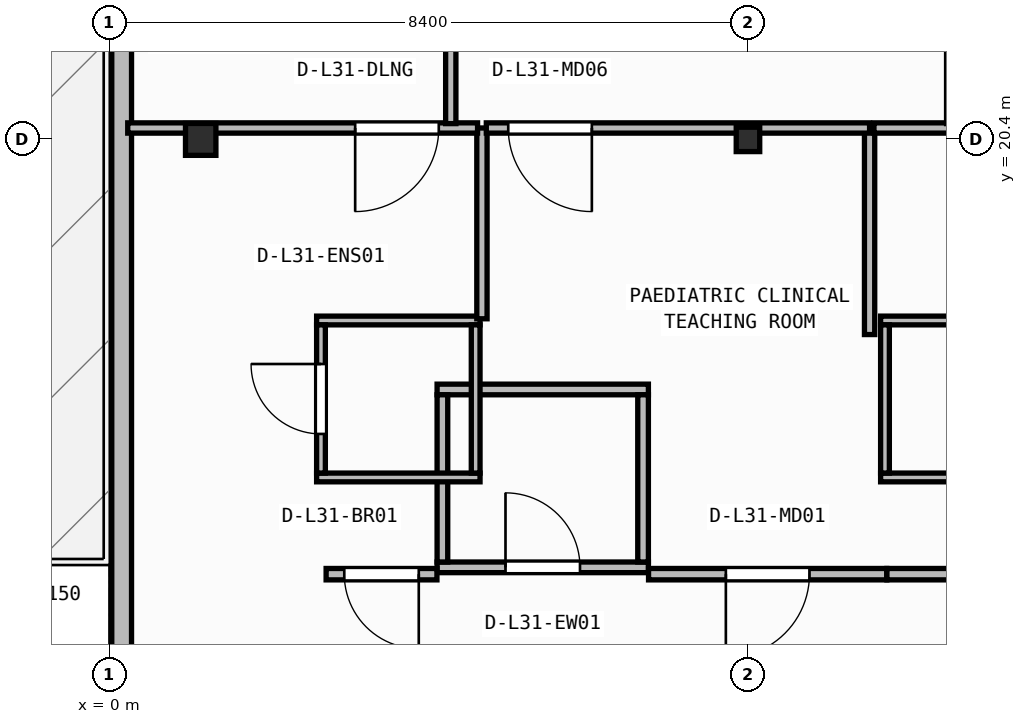
"""IFC4 building model, lengths in metres.
Left out: names, types, materials, properties, quantities, classifications, styles, units other than length and angle.
Written with IfcOpenShell. Run it as: python <this file> out.ifc"""

import sys

from ifc_helpers import new_model, si_unit, direction, frame, frame_2d, origin, origin_2d, place, context, subcontext, project, spatial, rectangle, i_section, extrude, element, fill, save


model = new_model("IFC4")
c1 = context("Model", 3, precision=1e-05, world=origin(), true_north=direction((0.0, 1.0)))
c2 = subcontext(c1, "Body", "Model", "MODEL_VIEW")
j1 = project(units=[si_unit("LENGTHUNIT", "METRE"), si_unit("PLANEANGLEUNIT", "RADIAN")], contexts=[c1])
p1 = place(None, origin())
s1 = spatial("IfcSite", under=j1, at=p1, CompositionType="ELEMENT")
p2 = place(p1, origin())
s2 = spatial("IfcBuilding", under=s1, at=p2, CompositionType="ELEMENT")
p3 = place(p2, frame((0.0, 0.0, 127.05)))
s3 = spatial("IfcBuildingStorey", under=s2, at=p3, CompositionType="ELEMENT", Elevation=127.05)
p4 = place(p3, frame((1.2, 20.4, 0.0), z_axis=(0.0, 0.0, 1.0), x_axis=(1.0, 0.0, 0.0)))
e1 = element("IfcColumn", 1, at=p4, inside=s3, PredefinedType="COLUMN", context=c2, shape_type="SweptSolid", body=[
    extrude(i_section(OverallWidth=0.4, OverallDepth=0.42, WebThickness=0.025, FlangeThickness=0.04, at=origin_2d()), origin(), (0.0, 0.0, 1.0), 3.95),
])
p5 = place(p3, frame((8.4, 20.4, 0.0), z_axis=(0.0, 0.0, 1.0), x_axis=(1.0, 0.0, 0.0)))
e2 = element("IfcColumn", 2, at=p5, inside=s3, PredefinedType="COLUMN", context=c2, shape_type="SweptSolid", body=[
    extrude(i_section(OverallWidth=0.309, OverallDepth=0.321, WebThickness=0.014, FlangeThickness=0.022, FilletRadius=0.017, at=origin_2d()), origin(), (0.0, 0.0, 1.0), 3.95),
])
p6 = place(p3, frame((0.16, 40.64, 0.0), z_axis=(0.0, 0.0, 1.0), x_axis=(0.0, -1.0, 0.0)))
e3 = element("IfcWall", 3, at=p6, inside=s3, PredefinedType="STANDARD", context=c2, shape_type="SweptSolid", body=[
    extrude(rectangle(XDim=37.88, YDim=0.26, at=frame_2d((18.94, 0.0))), origin(), (0.0, 0.0, 1.0), 3.71),
])
p7 = place(p6, frame((14.081, 0.0, 0.0)))
e4 = element("IfcOpeningElement", 4, at=p7, cuts=e3, PredefinedType="OPENING", context=c2, shape_type="SweptSolid", body=[
    extrude(rectangle(XDim=1.3, YDim=2.15, at=frame_2d((0.65, 1.075))), frame((0.0, 0.14, 0.0), z_axis=(0.0, -1.0, 0.0), x_axis=(1.0, 0.0, 0.0)), (0.0, 0.0, 1.0), 0.28),
])
p8 = place(p3, frame((4.31, 14.77, 0.0), z_axis=(0.0, 0.0, 1.0), x_axis=(1.0, 0.0, 0.0)))
e5 = element("IfcWall", 5, at=p8, inside=s3, PredefinedType="PARTITIONING", context=c2, shape_type="SweptSolid", body=[
    extrude(rectangle(XDim=2.78, YDim=0.14, at=frame_2d((1.39, 0.0))), origin(), (0.0, 0.0, 1.0), 3.71),
])
p9 = place(p8, frame((0.9, 0.0, 0.0)))
e6 = element("IfcOpeningElement", 6, at=p9, cuts=e5, PredefinedType="OPENING", context=c2, shape_type="SweptSolid", body=[
    extrude(rectangle(XDim=0.98, YDim=2.1, at=frame_2d((0.49, 1.05))), frame((0.0, 0.08, 0.0), z_axis=(0.0, -1.0, 0.0), x_axis=(1.0, 0.0, 0.0)), (0.0, 0.0, 1.0), 0.16),
])
p10 = place(p3, frame((4.31, 17.11, 0.0), z_axis=(0.0, 0.0, 1.0), x_axis=(1.0, 0.0, 0.0)))
e7 = element("IfcWall", 7, at=p10, inside=s3, PredefinedType="PARTITIONING", context=c2, shape_type="SweptSolid", body=[
    extrude(rectangle(XDim=2.78, YDim=0.14, at=frame_2d((1.39, 0.0))), origin(), (0.0, 0.0, 1.0), 3.71),
])
for number, where, z_axis, x_axis in (
    (8, (4.38, 14.84, 0.0), (0.0, 0.0, 1.0), (0.0, 1.0, 0.0)),
    (9, (7.02, 14.84, 0.0), (0.0, 0.0, 1.0), (0.0, 1.0, 0.0)),
):
    element("IfcWall", number, at=place(p3, frame(where, z_axis=z_axis, x_axis=x_axis)), inside=s3, PredefinedType="PARTITIONING", context=c2, shape_type="SweptSolid", body=[
        extrude(rectangle(XDim=2.2, YDim=0.14, at=frame_2d((1.1, 0.0))), origin(), (0.0, 0.0, 1.0), 3.71),
    ])
for number, where, z_axis, x_axis in (
    (10, (2.725, 15.952, 0.0), (0.0, 0.0, 1.0), (1.0, 0.0, 0.0)),
    (11, (2.725, 18.018, 0.0), (0.0, 0.0, 1.0), (1.0, 0.0, 0.0)),
):
    element("IfcWall", number, at=place(p3, frame(where, z_axis=z_axis, x_axis=x_axis)), inside=s3, PredefinedType="PARTITIONING", context=c2, shape_type="SweptSolid", body=[
        extrude(rectangle(XDim=2.15, YDim=0.115, at=frame_2d((1.075, 0.0))), origin(), (0.0, 0.0, 1.0), 3.71),
    ])
p11 = place(p3, frame((2.782, 16.01, 0.0), z_axis=(0.0, 0.0, 1.0), x_axis=(0.0, 1.0, 0.0)))
e12 = element("IfcWall", 12, at=p11, inside=s3, PredefinedType="PARTITIONING", context=c2, shape_type="SweptSolid", body=[
    extrude(rectangle(XDim=1.95, YDim=0.115, at=frame_2d((0.975, 0.0))), origin(), (0.0, 0.0, 1.0), 3.71),
])
p12 = place(p11, frame((0.515, 0.0, 0.0)))
e13 = element("IfcOpeningElement", 13, at=p12, cuts=e12, PredefinedType="OPENING", context=c2, shape_type="SweptSolid", body=[
    extrude(rectangle(XDim=0.92, YDim=2.1, at=frame_2d((0.46, 1.05))), frame((0.0, 0.067, 0.0), z_axis=(0.0, -1.0, 0.0), x_axis=(1.0, 0.0, 0.0)), (0.0, 0.0, 1.0), 0.135),
])
p13 = place(p3, frame((4.817, 16.01, 0.0), z_axis=(0.0, 0.0, 1.0), x_axis=(0.0, 1.0, 0.0)))
e14 = element("IfcWall", 14, at=p13, inside=s3, PredefinedType="PARTITIONING", context=c2, shape_type="SweptSolid", body=[
    extrude(rectangle(XDim=1.95, YDim=0.115, at=frame_2d((0.975, 0.0))), origin(), (0.0, 0.0, 1.0), 3.71),
])
for number, where, z_axis, x_axis in (
    (15, (10.145, 15.952, 0.0), (0.0, 0.0, 1.0), (1.0, 0.0, 0.0)),
    (16, (10.145, 18.018, 0.0), (0.0, 0.0, 1.0), (1.0, 0.0, 0.0)),
):
    element("IfcWall", number, at=place(p3, frame(where, z_axis=z_axis, x_axis=x_axis)), inside=s3, PredefinedType="PARTITIONING", context=c2, shape_type="SweptSolid", body=[
        extrude(rectangle(XDim=2.15, YDim=0.115, at=frame_2d((1.075, 0.0))), origin(), (0.0, 0.0, 1.0), 3.71),
    ])
p14 = place(p3, frame((10.202, 16.01, 0.0), z_axis=(0.0, 0.0, 1.0), x_axis=(0.0, 1.0, 0.0)))
e17 = element("IfcWall", 17, at=p14, inside=s3, PredefinedType="PARTITIONING", context=c2, shape_type="SweptSolid", body=[
    extrude(rectangle(XDim=1.95, YDim=0.115, at=frame_2d((0.975, 0.0))), origin(), (0.0, 0.0, 1.0), 3.71),
])
p15 = place(p3, frame((4.308, 14.68, 0.0), z_axis=(0.0, 0.0, 1.0), x_axis=(-1.0, 0.0, 0.0)))
e18 = element("IfcWall", 18, at=p15, inside=s3, PredefinedType="PARTITIONING", context=c2, shape_type="SweptSolid", body=[
    extrude(rectangle(XDim=1.458, YDim=0.15, at=frame_2d((0.729, 0.0))), origin(), (0.0, 0.0, 1.0), 3.71),
])
p16 = place(p15, frame((0.239, 0.0, 0.0)))
e19 = element("IfcOpeningElement", 19, at=p16, cuts=e18, PredefinedType="OPENING", context=c2, shape_type="SweptSolid", body=[
    extrude(rectangle(XDim=0.98, YDim=2.1, at=frame_2d((0.49, 1.05))), frame((0.0, 0.085, 0.0), z_axis=(0.0, -1.0, 0.0), x_axis=(1.0, 0.0, 0.0)), (0.0, 0.0, 1.0), 0.17),
])
p17 = place(p3, frame((10.226, 14.68, 0.0), z_axis=(0.0, 0.0, 1.0), x_axis=(-1.0, 0.0, 0.0)))
e20 = element("IfcWall", 20, at=p17, inside=s3, PredefinedType="PARTITIONING", context=c2, shape_type="SweptSolid", body=[
    extrude(rectangle(XDim=3.134, YDim=0.15, at=frame_2d((1.567, 0.0))), origin(), (0.0, 0.0, 1.0), 3.71),
])
p18 = place(p17, frame((1.017, 0.0, 0.0)))
e21 = element("IfcOpeningElement", 21, at=p18, cuts=e20, PredefinedType="OPENING", context=c2, shape_type="SweptSolid", body=[
    extrude(rectangle(XDim=1.1, YDim=2.1, at=frame_2d((0.55, 1.05))), frame((0.0, 0.085, 0.0), z_axis=(0.0, -1.0, 0.0), x_axis=(1.0, 0.0, 0.0)), (0.0, 0.0, 1.0), 0.17),
])
p19 = place(p3, frame((14.566, 14.68, 0.0), z_axis=(0.0, 0.0, 1.0), x_axis=(-1.0, 0.0, 0.0)))
e22 = element("IfcWall", 22, at=p19, inside=s3, PredefinedType="PARTITIONING", context=c2, shape_type="SweptSolid", body=[
    extrude(rectangle(XDim=4.338, YDim=0.15, at=frame_2d((2.169, 0.0))), origin(), (0.0, 0.0, 1.0), 3.71),
])
p20 = place(p19, frame((1.619, 0.0, 0.0)))
e23 = element("IfcOpeningElement", 23, at=p20, cuts=e22, PredefinedType="OPENING", context=c2, shape_type="SweptSolid", body=[
    extrude(rectangle(XDim=1.1, YDim=2.1, at=frame_2d((0.55, 1.05))), frame((0.0, 0.085, 0.0), z_axis=(0.0, -1.0, 0.0), x_axis=(1.0, 0.0, 0.0)), (0.0, 0.0, 1.0), 0.17),
])
p21 = place(p3, frame((4.9, 18.04, 0.0), z_axis=(0.0, 0.0, 1.0), x_axis=(0.0, 1.0, 0.0)))
e24 = element("IfcWall", 24, at=p21, inside=s3, PredefinedType="PARTITIONING", context=c2, shape_type="SweptSolid", body=[
    extrude(rectangle(XDim=2.51, YDim=0.135, at=frame_2d((1.255, 0.0))), origin(), (0.0, 0.0, 1.0), 3.71),
])
p22 = place(p3, frame((4.843, 20.55, 0.0), z_axis=(0.0, 0.0, 1.0), x_axis=(-1.0, 0.0, 0.0)))
e25 = element("IfcWall", 25, at=p22, inside=s3, PredefinedType="PARTITIONING", context=c2, shape_type="SweptSolid", body=[
    extrude(rectangle(XDim=4.603, YDim=0.135, at=frame_2d((2.301, 0.0))), origin(), (0.0, 0.0, 1.0), 3.083),
])
p23 = place(p22, frame((0.51, 0.0, 0.0)))
e26 = element("IfcOpeningElement", 26, at=p23, cuts=e25, PredefinedType="OPENING", context=c2, shape_type="SweptSolid", body=[
    extrude(rectangle(XDim=1.1, YDim=2.1, at=frame_2d((0.55, 1.05))), frame((0.0, 0.077, 0.0), z_axis=(0.0, -1.0, 0.0), x_axis=(1.0, 0.0, 0.0)), (0.0, 0.0, 1.0), 0.155),
])
p24 = place(p3, frame((10.0, 17.833, 0.0), z_axis=(0.0, 0.0, 1.0), x_axis=(0.0, 1.0, 0.0)))
e27 = element("IfcWall", 27, at=p24, inside=s3, PredefinedType="PARTITIONING", context=c2, shape_type="SweptSolid", body=[
    extrude(rectangle(XDim=2.718, YDim=0.135, at=frame_2d((1.359, 0.0))), origin(), (0.0, 0.0, 1.0), 3.71),
])
p25 = place(p3, frame((10.0, 20.55, 0.0), z_axis=(0.0, 0.0, 1.0), x_axis=(-1.0, 0.0, 0.0)))
e28 = element("IfcWall", 28, at=p25, inside=s3, PredefinedType="PARTITIONING", context=c2, shape_type="SweptSolid", body=[
    extrude(rectangle(XDim=5.042, YDim=0.135, at=frame_2d((2.521, 0.0))), origin(), (0.0, 0.0, 1.0), 3.083),
])
p26 = place(p25, frame((3.654, 0.0, 0.0)))
e29 = element("IfcOpeningElement", 29, at=p26, cuts=e28, PredefinedType="OPENING", context=c2, shape_type="SweptSolid", body=[
    extrude(rectangle(XDim=1.1, YDim=2.1, at=frame_2d((0.55, 1.05))), frame((0.0, 0.077, 0.0), z_axis=(0.0, -1.0, 0.0), x_axis=(1.0, 0.0, 0.0)), (0.0, 0.0, 1.0), 0.155),
])
p27 = place(p3, frame((14.34, 20.55, 0.0), z_axis=(0.0, 0.0, 1.0), x_axis=(-1.0, 0.0, 0.0)))
e30 = element("IfcWall", 30, at=p27, inside=s3, PredefinedType="PARTITIONING", context=c2, shape_type="SweptSolid", body=[
    extrude(rectangle(XDim=4.282, YDim=0.135, at=frame_2d((2.141, 0.0))), origin(), (0.0, 0.0, 1.0), 3.083),
])
p28 = place(p3, frame((4.49, 20.607, 0.0), z_axis=(0.0, 0.0, 1.0), x_axis=(0.0, 1.0, 0.0)))
e31 = element("IfcWall", 31, at=p28, inside=s3, PredefinedType="PARTITIONING", context=c2, shape_type="SweptSolid", body=[
    extrude(rectangle(XDim=6.493, YDim=0.135, at=frame_2d((3.246, 0.0))), origin(), (0.0, 0.0, 1.0), 3.71),
])
p29 = place(p9, origin())
e32 = element("IfcDoor", 32, at=p29, inside=s3, OperationType="SINGLE_SWING_LEFT", PredefinedType="DOOR", context=c2, shape_type="SweptSolid", body=[
    extrude(rectangle(XDim=0.98, YDim=2.1, at=frame_2d((0.49, 1.05))), frame((0.0, 0.025, 0.0), z_axis=(0.0, -1.0, 0.0), x_axis=(1.0, 0.0, 0.0)), (0.0, 0.0, 1.0), 0.05),
])
fill(e6, e32)
p30 = place(p12, origin())
e33 = element("IfcDoor", 33, at=p30, inside=s3, OperationType="SINGLE_SWING_RIGHT", PredefinedType="DOOR", context=c2, shape_type="SweptSolid", body=[
    extrude(rectangle(XDim=0.92, YDim=2.1, at=frame_2d((0.46, 1.05))), frame((0.0, 0.025, 0.0), z_axis=(0.0, -1.0, 0.0), x_axis=(1.0, 0.0, 0.0)), (0.0, 0.0, 1.0), 0.05),
])
fill(e13, e33)
p31 = place(p16, origin())
e34 = element("IfcDoor", 34, at=p31, inside=s3, OperationType="SINGLE_SWING_LEFT", PredefinedType="DOOR", context=c2, shape_type="SweptSolid", body=[
    extrude(rectangle(XDim=0.98, YDim=2.1, at=frame_2d((0.49, 1.05))), frame((0.0, 0.025, 0.0), z_axis=(0.0, -1.0, 0.0), x_axis=(1.0, 0.0, 0.0)), (0.0, 0.0, 1.0), 0.05),
])
fill(e19, e34)
p32 = place(p18, origin())
e35 = element("IfcDoor", 35, at=p32, inside=s3, OperationType="SINGLE_SWING_RIGHT", PredefinedType="DOOR", context=c2, shape_type="SweptSolid", body=[
    extrude(rectangle(XDim=1.1, YDim=2.1, at=frame_2d((0.55, 1.05))), frame((0.0, 0.025, 0.0), z_axis=(0.0, -1.0, 0.0), x_axis=(1.0, 0.0, 0.0)), (0.0, 0.0, 1.0), 0.05),
])
fill(e21, e35)
p33 = place(p23, origin())
e36 = element("IfcDoor", 36, at=p33, inside=s3, OperationType="SINGLE_SWING_RIGHT", PredefinedType="DOOR", context=c2, shape_type="SweptSolid", body=[
    extrude(rectangle(XDim=1.1, YDim=2.1, at=frame_2d((0.55, 1.05))), frame((0.0, 0.025, 0.0), z_axis=(0.0, -1.0, 0.0), x_axis=(1.0, 0.0, 0.0)), (0.0, 0.0, 1.0), 0.05),
])
fill(e26, e36)
p34 = place(p26, origin())
e37 = element("IfcDoor", 37, at=p34, inside=s3, OperationType="SINGLE_SWING_LEFT", PredefinedType="DOOR", context=c2, shape_type="SweptSolid", body=[
    extrude(rectangle(XDim=1.1, YDim=2.1, at=frame_2d((0.55, 1.05))), frame((0.0, 0.025, 0.0), z_axis=(0.0, -1.0, 0.0), x_axis=(1.0, 0.0, 0.0)), (0.0, 0.0, 1.0), 0.05),
])
fill(e29, e37)
save(model, sys.argv[1])
